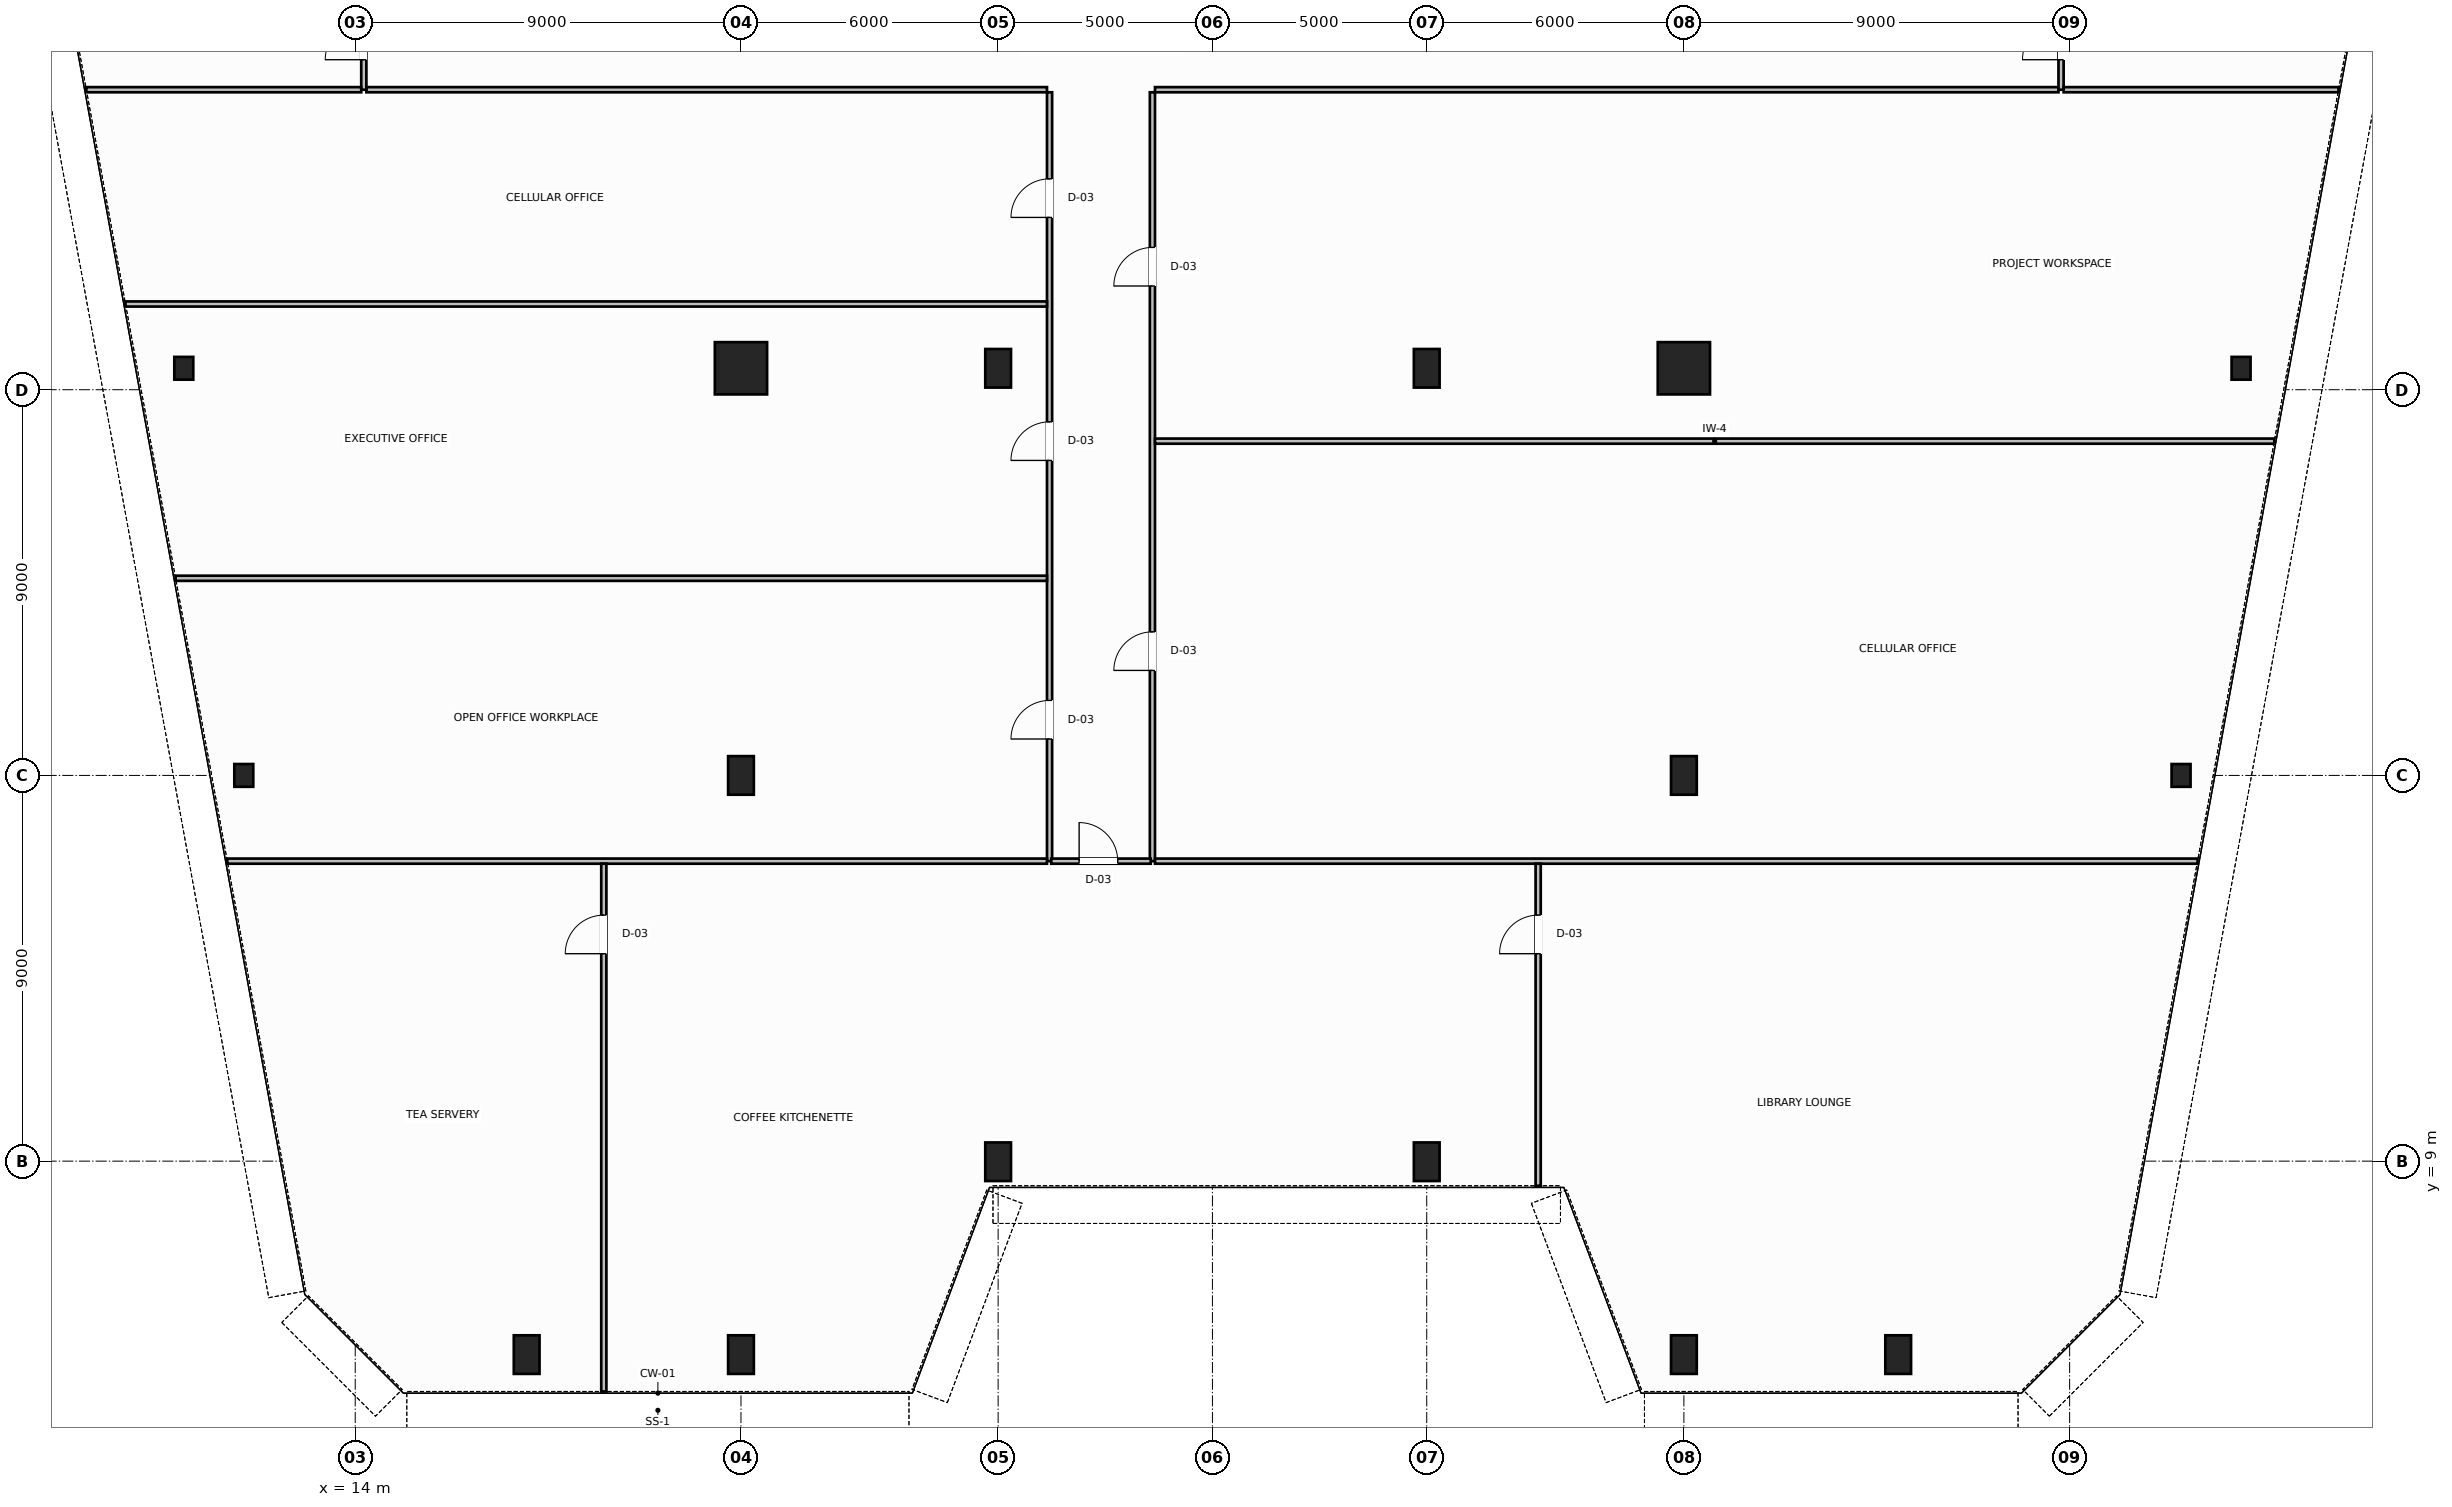
"""IFC4 building model, lengths in metres.
Left out: names, types, materials, properties, quantities, classifications, styles, units other than length and angle.
Written with IfcOpenShell. Run it as: python <this file> out.ifc"""

import sys

from ifc_helpers import new_model, si_unit, direction, frame, frame_2d, origin, origin_2d, place, context, subcontext, project, spatial, rectangle, hollow_rectangle, hollow_circle, i_section, extrude, source, transform, mapped, element, fill, save


model = new_model("IFC4")
c1 = context("Model", 3, precision=1e-05, world=origin(), true_north=direction((0.0, 1.0)))
c2 = subcontext(c1, "Body", "Model", "MODEL_VIEW")
j1 = project(units=[si_unit("LENGTHUNIT", "METRE"), si_unit("PLANEANGLEUNIT", "RADIAN")], contexts=[c1])
p1 = place(None, origin())
s1 = spatial("IfcSite", under=j1, at=p1, CompositionType="ELEMENT")
p2 = place(p1, origin())
s2 = spatial("IfcBuilding", under=s1, at=p2, CompositionType="ELEMENT")
p3 = place(p2, frame((0.0, 0.0, 75.8)))
s3 = spatial("IfcBuildingStorey", under=s2, at=p3, CompositionType="ELEMENT", Elevation=75.8)
m1 = source(origin(), c2, "Body", "SweptSolid", [
    extrude(i_section(OverallWidth=0.442, OverallDepth=0.531, WebThickness=0.065, FlangeThickness=0.076, FilletRadius=0.015, at=origin_2d()), origin(), (0.0, 0.0, 1.0), 3.8),
])
for number, where, z_axis, x_axis in (
    (1, (10.0, 27.5, 0.0), (0.0, 0.0, 1.0), (1.0, 0.0, 0.0)),
    (2, (11.4, 18.0, 0.0), (0.0, 0.0, 1.0), (1.0, 0.0, 0.0)),
    (3, (58.0, 27.5, 0.0), (0.0, 0.0, 1.0), (1.0, 0.0, 0.0)),
    (4, (56.6, 18.0, 0.0), (0.0, 0.0, 1.0), (1.0, 0.0, 0.0)),
):
    element("IfcColumn", number, at=place(p3, frame(where, z_axis=z_axis, x_axis=x_axis)), inside=s3, PredefinedType="COLUMN", context=c2, shape_type="MappedRepresentation", body=[
        mapped(m1, transform((0.0, 0.0, 0.0), scale=1.0)),
    ])
m2 = source(origin(), c2, "Body", "SweptSolid", [
    extrude(hollow_circle(Radius=0.61, WallThickness=0.05, at=origin_2d()), origin(), (0.0, 0.0, 1.0), 3.8),
])
p4 = place(p3, frame((23.0, 27.5, 0.0), z_axis=(0.0, 0.0, 1.0), x_axis=(1.0, 0.0, 0.0)))
e5 = element("IfcColumn", 5, at=p4, inside=s3, PredefinedType="COLUMN", context=c2, shape_type="MappedRepresentation", body=[
    mapped(m2, transform((0.0, 0.0, 0.0), scale=1.0)),
])
m3 = source(origin(), c2, "Body", "SweptSolid", [
    extrude(hollow_rectangle(XDim=0.6, YDim=0.9, WallThickness=0.04, InnerFilletRadius=0.04, OuterFilletRadius=0.08, at=origin_2d()), origin(), (0.0, 0.0, 1.0), 3.8),
])
for number, where, z_axis, x_axis in (
    (6, (29.0, 27.5, 0.0), (0.0, 0.0, 1.0), (1.0, 0.0, 0.0)),
    (7, (39.0, 27.5, 0.0), (0.0, 0.0, 1.0), (1.0, 0.0, 0.0)),
):
    element("IfcColumn", number, at=place(p3, frame(where, z_axis=z_axis, x_axis=x_axis)), inside=s3, PredefinedType="COLUMN", context=c2, shape_type="MappedRepresentation", body=[
        mapped(m3, transform((0.0, 0.0, 0.0), scale=1.0)),
    ])
p5 = place(p3, frame((45.0, 27.5, 0.0), z_axis=(0.0, 0.0, 1.0), x_axis=(1.0, 0.0, 0.0)))
e8 = element("IfcColumn", 8, at=p5, inside=s3, PredefinedType="COLUMN", context=c2, shape_type="MappedRepresentation", body=[
    mapped(m2, transform((0.0, 0.0, 0.0), scale=1.0)),
])
for number, where, z_axis, x_axis in (
    (9, (23.0, 18.0, 0.0), (0.0, 0.0, 1.0), (1.0, 0.0, 0.0)),
    (10, (45.0, 18.0, 0.0), (0.0, 0.0, 1.0), (1.0, 0.0, 0.0)),
):
    element("IfcColumn", number, at=place(p3, frame(where, z_axis=z_axis, x_axis=x_axis)), inside=s3, PredefinedType="COLUMN", context=c2, shape_type="MappedRepresentation", body=[
        mapped(m3, transform((0.0, 0.0, 0.0), scale=1.0)),
    ])
m4 = source(origin(), c2, "Body", "SweptSolid", [
    extrude(hollow_rectangle(XDim=0.6, YDim=0.9, WallThickness=0.04, InnerFilletRadius=0.04, OuterFilletRadius=0.08, at=origin_2d()), origin(), (0.0, 0.0, 1.0), 3.744),
])
for number, where, z_axis, x_axis in (
    (11, (18.0, 4.486, 0.032), (0.0, 0.064, 0.998), (-1.0, 0.0, 0.0)),
    (12, (23.0, 4.486, 0.032), (0.0, 0.064, 0.998), (-1.0, 0.0, 0.0)),
    (13, (29.0, 8.986, 0.032), (0.0, 0.064, 0.998), (-1.0, 0.0, 0.0)),
    (14, (39.0, 8.986, 0.032), (0.0, 0.064, 0.998), (-1.0, 0.0, 0.0)),
    (15, (45.0, 4.486, 0.032), (0.0, 0.064, 0.998), (-1.0, 0.0, 0.0)),
    (16, (50.0, 4.486, 0.032), (0.0, 0.064, 0.998), (-1.0, 0.0, 0.0)),
):
    element("IfcColumn", number, at=place(p3, frame(where, z_axis=z_axis, x_axis=x_axis)), inside=s3, PredefinedType="COLUMN", context=c2, shape_type="MappedRepresentation", body=[
        mapped(m4, transform((0.0, 0.0, 0.0), scale=1.0)),
    ])
p6 = place(p3, frame((14.26, 34.0, 0.0), z_axis=(0.0, 0.0, 1.0), x_axis=(1.0, 0.0, 0.0)))
e17 = element("IfcWall", 17, at=p6, inside=s3, PredefinedType="PARTITIONING", context=c2, shape_type="SweptSolid", body=[
    extrude(rectangle(XDim=15.88, YDim=0.12, at=frame_2d((7.94, 0.0))), origin(), (0.0, 0.0, 1.0), 3.58),
])
p7 = place(p3, frame((32.66, 34.0, 0.0), z_axis=(0.0, 0.0, 1.0), x_axis=(1.0, 0.0, 0.0)))
e18 = element("IfcWall", 18, at=p7, inside=s3, PredefinedType="PARTITIONING", context=c2, shape_type="SweptSolid", body=[
    extrude(rectangle(XDim=21.08, YDim=0.12, at=frame_2d((10.54, 0.0))), origin(), (0.0, 0.0, 1.0), 3.58),
])
p8 = place(p3, frame((14.2, 34.0, 0.0), z_axis=(0.0, 0.0, 1.0), x_axis=(0.0, 1.0, 0.0)))
e19 = element("IfcWall", 19, at=p8, inside=s3, PredefinedType="PARTITIONING", context=c2, shape_type="SweptSolid", body=[
    extrude(rectangle(XDim=2.44, YDim=0.12, at=frame_2d((1.22, 0.0))), origin(), (0.0, 0.0, 1.0), 3.58),
])
p9 = place(p8, frame((0.7, 0.0, 0.0)))
e20 = element("IfcOpeningElement", 20, at=p9, cuts=e19, PredefinedType="OPENING", context=c2, shape_type="SweptSolid", body=[
    extrude(rectangle(XDim=0.9, YDim=2.15, at=frame_2d((0.45, 1.075))), frame((0.0, 0.07, 0.0), z_axis=(0.0, -1.0, 0.0), x_axis=(1.0, 0.0, 0.0)), (0.0, 0.0, 1.0), 0.14),
])
p10 = place(p3, frame((53.8, 34.0, 0.0), z_axis=(0.0, 0.0, 1.0), x_axis=(0.0, 1.0, 0.0)))
e21 = element("IfcWall", 21, at=p10, inside=s3, PredefinedType="PARTITIONING", context=c2, shape_type="SweptSolid", body=[
    extrude(rectangle(XDim=2.44, YDim=0.12, at=frame_2d((1.22, 0.0))), origin(), (0.0, 0.0, 1.0), 3.58),
])
p11 = place(p10, frame((0.7, 0.0, 0.0)))
e22 = element("IfcOpeningElement", 22, at=p11, cuts=e21, PredefinedType="OPENING", context=c2, shape_type="SweptSolid", body=[
    extrude(rectangle(XDim=0.9, YDim=2.15, at=frame_2d((0.45, 1.075))), frame((0.0, 0.07, 0.0), z_axis=(0.0, -1.0, 0.0), x_axis=(1.0, 0.0, 0.0)), (0.0, 0.0, 1.0), 0.14),
])
p12 = place(p3, frame((30.2, 16.0, 0.0), z_axis=(0.0, 0.0, 1.0), x_axis=(0.0, 1.0, 0.0)))
e23 = element("IfcWall", 23, at=p12, inside=s3, PredefinedType="PARTITIONING", context=c2, shape_type="SweptSolid", body=[
    extrude(rectangle(XDim=17.94, YDim=0.12, at=frame_2d((8.97, 0.0))), origin(), (0.0, 0.0, 1.0), 3.58),
])
p13 = place(p12, frame((2.85, 0.0, 0.0)))
e24 = element("IfcOpeningElement", 24, at=p13, cuts=e23, PredefinedType="OPENING", context=c2, shape_type="SweptSolid", body=[
    extrude(rectangle(XDim=0.9, YDim=2.15, at=frame_2d((0.45, 1.075))), frame((0.0, 0.07, 0.0), z_axis=(0.0, -1.0, 0.0), x_axis=(1.0, 0.0, 0.0)), (0.0, 0.0, 1.0), 0.14),
])
p14 = place(p12, frame((9.35, 0.0, 0.0)))
e25 = element("IfcOpeningElement", 25, at=p14, cuts=e23, PredefinedType="OPENING", context=c2, shape_type="SweptSolid", body=[
    extrude(rectangle(XDim=0.9, YDim=2.15, at=frame_2d((0.45, 1.075))), frame((0.0, 0.07, 0.0), z_axis=(0.0, -1.0, 0.0), x_axis=(1.0, 0.0, 0.0)), (0.0, 0.0, 1.0), 0.14),
])
p15 = place(p12, frame((15.02, 0.0, 0.0)))
e26 = element("IfcOpeningElement", 26, at=p15, cuts=e23, PredefinedType="OPENING", context=c2, shape_type="SweptSolid", body=[
    extrude(rectangle(XDim=0.9, YDim=2.15, at=frame_2d((0.45, 1.075))), frame((0.0, 0.07, 0.0), z_axis=(0.0, -1.0, 0.0), x_axis=(1.0, 0.0, 0.0)), (0.0, 0.0, 1.0), 0.14),
])
p16 = place(p3, frame((32.6, 16.0, 0.0), z_axis=(0.0, 0.0, 1.0), x_axis=(0.0, 1.0, 0.0)))
e27 = element("IfcWall", 27, at=p16, inside=s3, PredefinedType="PARTITIONING", context=c2, shape_type="SweptSolid", body=[
    extrude(rectangle(XDim=17.94, YDim=0.12, at=frame_2d((8.97, 0.0))), origin(), (0.0, 0.0, 1.0), 3.58),
])
p17 = place(p16, frame((4.45, 0.0, 0.0)))
e28 = element("IfcOpeningElement", 28, at=p17, cuts=e27, PredefinedType="OPENING", context=c2, shape_type="SweptSolid", body=[
    extrude(rectangle(XDim=0.9, YDim=2.15, at=frame_2d((0.45, 1.075))), frame((0.0, 0.07, 0.0), z_axis=(0.0, -1.0, 0.0), x_axis=(1.0, 0.0, 0.0)), (0.0, 0.0, 1.0), 0.14),
])
p18 = place(p16, frame((13.42, 0.0, 0.0)))
e29 = element("IfcOpeningElement", 29, at=p18, cuts=e27, PredefinedType="OPENING", context=c2, shape_type="SweptSolid", body=[
    extrude(rectangle(XDim=0.9, YDim=2.15, at=frame_2d((0.45, 1.075))), frame((0.0, 0.07, 0.0), z_axis=(0.0, -1.0, 0.0), x_axis=(1.0, 0.0, 0.0)), (0.0, 0.0, 1.0), 0.14),
])
p19 = place(p3, frame((30.24, 16.0, 0.0), z_axis=(0.0, 0.0, 1.0), x_axis=(1.0, 0.0, 0.0)))
e30 = element("IfcWall", 30, at=p19, inside=s3, PredefinedType="PARTITIONING", context=c2, shape_type="SweptSolid", body=[
    extrude(rectangle(XDim=2.32, YDim=0.12, at=frame_2d((1.16, 0.0))), origin(), (0.0, 0.0, 1.0), 3.58),
])
p20 = place(p19, frame((0.65, 0.0, 0.0)))
e31 = element("IfcOpeningElement", 31, at=p20, cuts=e30, PredefinedType="OPENING", context=c2, shape_type="SweptSolid", body=[
    extrude(rectangle(XDim=0.9, YDim=2.15, at=frame_2d((0.45, 1.075))), frame((0.0, 0.07, 0.0), z_axis=(0.0, -1.0, 0.0), x_axis=(1.0, 0.0, 0.0)), (0.0, 0.0, 1.0), 0.14),
])
for number, where, z_axis, x_axis in (
    (32, (7.726, 34.0, 0.0), (0.0, 0.0, 1.0), (1.0, 0.0, 0.0)),
    (33, (53.86, 34.0, 0.0), (0.0, 0.0, 1.0), (1.0, 0.0, 0.0)),
):
    element("IfcWall", number, at=place(p3, frame(where, z_axis=z_axis, x_axis=x_axis)), inside=s3, PredefinedType="PARTITIONING", context=c2, shape_type="SweptSolid", body=[
        extrude(rectangle(XDim=6.414, YDim=0.12, at=frame_2d((3.207, 0.0))), origin(), (0.0, 0.0, 1.0), 3.58),
    ])
p21 = place(p3, frame((9.809, 22.6, 0.0), z_axis=(0.0, 0.0, 1.0), x_axis=(1.0, 0.0, 0.0)))
e34 = element("IfcWall", 34, at=p21, inside=s3, PredefinedType="PARTITIONING", context=c2, shape_type="SweptSolid", body=[
    extrude(rectangle(XDim=20.331, YDim=0.12, at=frame_2d((10.166, 0.0))), origin(), (0.0, 0.0, 1.0), 3.58),
])
p22 = place(p3, frame((8.64, 29.0, 0.0), z_axis=(0.0, 0.0, 1.0), x_axis=(1.0, 0.0, 0.0)))
e35 = element("IfcWall", 35, at=p22, inside=s3, PredefinedType="PARTITIONING", context=c2, shape_type="SweptSolid", body=[
    extrude(rectangle(XDim=21.5, YDim=0.12, at=frame_2d((10.75, 0.0))), origin(), (0.0, 0.0, 1.0), 3.58),
])
p23 = place(p3, frame((32.66, 25.8, 0.0), z_axis=(0.0, 0.0, 1.0), x_axis=(1.0, 0.0, 0.0)))
e36 = element("IfcWall", 36, at=p23, inside=s3, PredefinedType="PARTITIONING", context=c2, shape_type="SweptSolid", body=[
    extrude(rectangle(XDim=26.115, YDim=0.12, at=frame_2d((13.058, 0.0))), origin(), (0.0, 0.0, 1.0), 3.58),
])
p24 = place(p3, frame((11.015, 16.0, 0.0), z_axis=(0.0, 0.0, 1.0), x_axis=(1.0, 0.0, 0.0)))
e37 = element("IfcWall", 37, at=p24, inside=s3, PredefinedType="PARTITIONING", context=c2, shape_type="SweptSolid", body=[
    extrude(rectangle(XDim=19.125, YDim=0.12, at=frame_2d((9.562, 0.0))), origin(), (0.0, 0.0, 1.0), 3.58),
])
p25 = place(p3, frame((32.66, 16.0, 0.0), z_axis=(0.0, 0.0, 1.0), x_axis=(1.0, 0.0, 0.0)))
e38 = element("IfcWall", 38, at=p25, inside=s3, PredefinedType="PARTITIONING", context=c2, shape_type="SweptSolid", body=[
    extrude(rectangle(XDim=24.325, YDim=0.12, at=frame_2d((12.163, 0.0))), origin(), (0.0, 0.0, 1.0), 3.58),
])
p26 = place(p3, frame((19.8, 3.626, 0.0), z_axis=(0.0, 0.0, 1.0), x_axis=(0.0, 1.0, 0.0)))
e39 = element("IfcWall", 39, at=p26, inside=s3, PredefinedType="PARTITIONING", context=c2, shape_type="SweptSolid", body=[
    extrude(rectangle(XDim=12.314, YDim=0.12, at=frame_2d((6.157, 0.0))), origin(), (0.0, 0.0, 1.0), 3.58),
])
p27 = place(p26, frame((10.214, 0.0, 0.0)))
e40 = element("IfcOpeningElement", 40, at=p27, cuts=e39, PredefinedType="OPENING", context=c2, shape_type="SweptSolid", body=[
    extrude(rectangle(XDim=0.9, YDim=2.15, at=frame_2d((0.45, 1.075))), frame((0.0, 0.07, 0.0), z_axis=(0.0, -1.0, 0.0), x_axis=(1.0, 0.0, 0.0)), (0.0, 0.0, 1.0), 0.14),
])
p28 = place(p3, frame((41.6, 8.426, 0.0), z_axis=(0.0, 0.0, 1.0), x_axis=(0.0, 1.0, 0.0)))
e41 = element("IfcWall", 41, at=p28, inside=s3, PredefinedType="PARTITIONING", context=c2, shape_type="SweptSolid", body=[
    extrude(rectangle(XDim=7.514, YDim=0.12, at=frame_2d((3.757, 0.0))), origin(), (0.0, 0.0, 1.0), 3.58),
])
p29 = place(p28, frame((5.414, 0.0, 0.0)))
e42 = element("IfcOpeningElement", 42, at=p29, cuts=e41, PredefinedType="OPENING", context=c2, shape_type="SweptSolid", body=[
    extrude(rectangle(XDim=0.9, YDim=2.15, at=frame_2d((0.45, 1.075))), frame((0.0, 0.07, 0.0), z_axis=(0.0, -1.0, 0.0), x_axis=(1.0, 0.0, 0.0)), (0.0, 0.0, 1.0), 0.14),
])
m5 = source(origin(), c2, "Body", "SweptSolid", [
    extrude(rectangle(XDim=0.9, YDim=2.15, at=frame_2d((0.45, 1.075))), frame((0.0, 0.025, 0.0), z_axis=(0.0, -1.0, 0.0), x_axis=(1.0, 0.0, 0.0)), (0.0, 0.0, 1.0), 0.05),
])
p30 = place(p9, origin())
e43 = element("IfcDoor", 43, at=p30, inside=s3, OperationType="SINGLE_SWING_LEFT", PredefinedType="DOOR", context=c2, shape_type="MappedRepresentation", body=[
    mapped(m5, transform((0.0, 0.0, 0.0), scale=1.0)),
])
fill(e20, e43)
p31 = place(p11, origin())
e44 = element("IfcDoor", 44, at=p31, inside=s3, OperationType="SINGLE_SWING_RIGHT", PredefinedType="DOOR", context=c2, shape_type="MappedRepresentation", body=[
    mapped(m5, transform((0.0, 0.0, 0.0), scale=1.0)),
])
fill(e22, e44)
p32 = place(p13, origin())
e45 = element("IfcDoor", 45, at=p32, inside=s3, OperationType="SINGLE_SWING_LEFT", PredefinedType="DOOR", context=c2, shape_type="MappedRepresentation", body=[
    mapped(m5, transform((0.0, 0.0, 0.0), scale=1.0)),
])
fill(e24, e45)
p33 = place(p14, origin())
e46 = element("IfcDoor", 46, at=p33, inside=s3, OperationType="SINGLE_SWING_RIGHT", PredefinedType="DOOR", context=c2, shape_type="MappedRepresentation", body=[
    mapped(m5, transform((0.0, 0.0, 0.0), scale=1.0)),
])
fill(e25, e46)
p34 = place(p15, origin())
e47 = element("IfcDoor", 47, at=p34, inside=s3, OperationType="SINGLE_SWING_LEFT", PredefinedType="DOOR", context=c2, shape_type="MappedRepresentation", body=[
    mapped(m5, transform((0.0, 0.0, 0.0), scale=1.0)),
])
fill(e26, e47)
p35 = place(p17, origin())
e48 = element("IfcDoor", 48, at=p35, inside=s3, OperationType="SINGLE_SWING_RIGHT", PredefinedType="DOOR", context=c2, shape_type="MappedRepresentation", body=[
    mapped(m5, transform((0.0, 0.0, 0.0), scale=1.0)),
])
fill(e28, e48)
p36 = place(p18, origin())
e49 = element("IfcDoor", 49, at=p36, inside=s3, OperationType="SINGLE_SWING_LEFT", PredefinedType="DOOR", context=c2, shape_type="MappedRepresentation", body=[
    mapped(m5, transform((0.0, 0.0, 0.0), scale=1.0)),
])
fill(e29, e49)
p37 = place(p27, origin())
e50 = element("IfcDoor", 50, at=p37, inside=s3, OperationType="SINGLE_SWING_RIGHT", PredefinedType="DOOR", context=c2, shape_type="MappedRepresentation", body=[
    mapped(m5, transform((0.0, 0.0, 0.0), scale=1.0)),
])
fill(e40, e50)
p38 = place(p20, origin())
e51 = element("IfcDoor", 51, at=p38, inside=s3, OperationType="SINGLE_SWING_LEFT", PredefinedType="DOOR", context=c2, shape_type="MappedRepresentation", body=[
    mapped(m5, transform((0.0, 0.0, 0.0), scale=1.0)),
])
fill(e31, e51)
p39 = place(p29, origin())
e52 = element("IfcDoor", 52, at=p39, inside=s3, OperationType="SINGLE_SWING_LEFT", PredefinedType="DOOR", context=c2, shape_type="MappedRepresentation", body=[
    mapped(m5, transform((0.0, 0.0, 0.0), scale=1.0)),
])
fill(e42, e52)
save(model, sys.argv[1])
